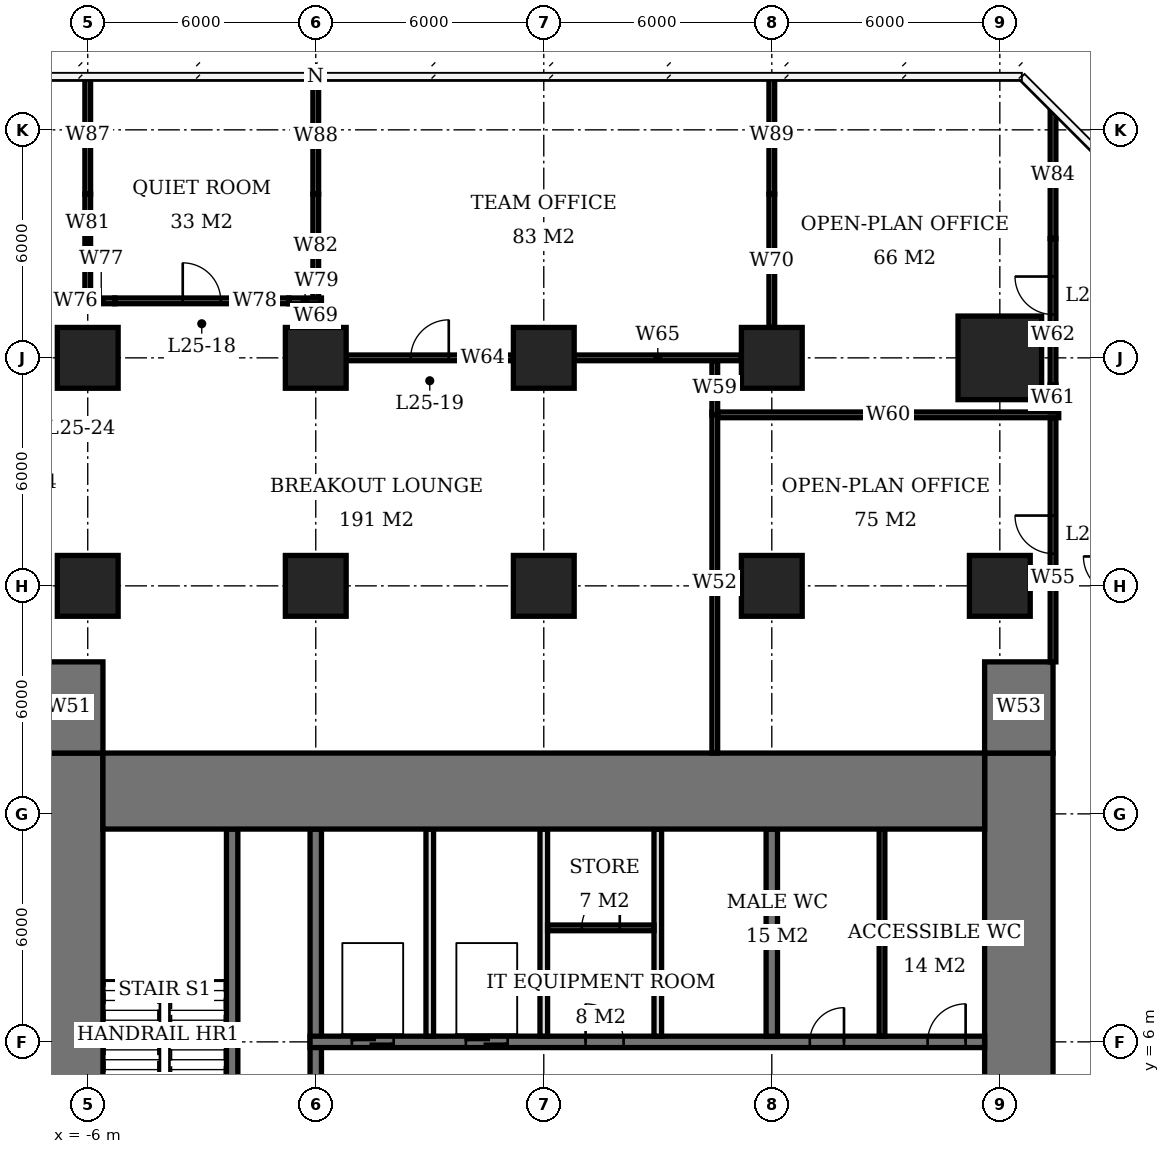
"""IFC4 building model, lengths in metres.
Left out: names, types, materials, properties, quantities, classifications, styles, units other than length and angle.
Written with IfcOpenShell. Run it as: python <this file> out.ifc"""

import sys

from ifc_helpers import new_model, si_unit, direction, frame, frame_2d, origin, origin_2d, place, context, subcontext, project, spatial, rectangle, extrude, element, fill, save


model = new_model("IFC4")
c1 = context("Model", 3, precision=1e-05, world=origin(), true_north=direction((0.0, 1.0)))
c2 = subcontext(c1, "Body", "Model", "MODEL_VIEW")
j1 = project(units=[si_unit("LENGTHUNIT", "METRE"), si_unit("PLANEANGLEUNIT", "RADIAN")], contexts=[c1])
p1 = place(None, origin())
s1 = spatial("IfcSite", under=j1, at=p1, CompositionType="ELEMENT")
p2 = place(p1, origin())
s2 = spatial("IfcBuilding", under=s1, at=p2, CompositionType="ELEMENT")
p3 = place(p2, frame((0.0, 0.0, 105.5)))
s3 = spatial("IfcBuildingStorey", under=s2, at=p3, CompositionType="ELEMENT", Elevation=105.5)
for number, where, z_axis, x_axis in (
    (1, (-6.0, 18.0, 0.0), (0.0, 0.0, 1.0), (1.0, 0.0, 0.0)),
    (2, (-6.0, 24.0, 0.0), (0.0, 0.0, 1.0), (1.0, 0.0, 0.0)),
    (3, (0.0, 18.0, 0.0), (0.0, 0.0, 1.0), (1.0, 0.0, 0.0)),
    (4, (0.0, 24.0, 0.0), (0.0, 0.0, 1.0), (1.0, 0.0, 0.0)),
    (5, (6.0, 18.0, 0.0), (0.0, 0.0, 1.0), (1.0, 0.0, 0.0)),
    (6, (6.0, 24.0, 0.0), (0.0, 0.0, 1.0), (1.0, 0.0, 0.0)),
    (7, (12.0, 18.0, 0.0), (0.0, 0.0, 1.0), (1.0, 0.0, 0.0)),
    (8, (12.0, 24.0, 0.0), (0.0, 0.0, 1.0), (1.0, 0.0, 0.0)),
    (9, (18.0, 18.0, 0.0), (0.0, 0.0, 1.0), (1.0, 0.0, 0.0)),
):
    element("IfcColumn", number, at=place(p3, frame(where, z_axis=z_axis, x_axis=x_axis)), inside=s3, PredefinedType="COLUMN", context=c2, shape_type="SweptSolid", body=[
        extrude(rectangle(XDim=1.6, YDim=1.6, at=origin_2d()), origin(), (0.0, 0.0, 1.0), 3.9),
    ])
p4 = place(p3, frame((18.0, 24.0, 0.0), z_axis=(0.0, 0.0, 1.0), x_axis=(1.0, 0.0, 0.0)))
e10 = element("IfcColumn", 10, at=p4, inside=s3, PredefinedType="COLUMN", context=c2, shape_type="SweptSolid", body=[
    extrude(rectangle(XDim=2.2, YDim=2.2, at=origin_2d()), origin(), (0.0, 0.0, 1.0), 3.9),
])
p5 = place(p3, frame((-5.6, 12.6, 0.0), z_axis=(0.0, 0.0, 1.0), x_axis=(1.0, 0.0, 0.0)))
e11 = element("IfcWall", 11, at=p5, inside=s3, PredefinedType="SHEAR", context=c2, shape_type="SweptSolid", body=[
    extrude(rectangle(XDim=23.2, YDim=2.0, at=frame_2d((11.6, 0.0))), origin(), (0.0, 0.0, 1.0), 3.9),
])
p6 = place(p3, frame((-6.5, -7.6, 0.0), z_axis=(0.0, 0.0, 1.0), x_axis=(0.0, 1.0, 0.0)))
e12 = element("IfcWall", 12, at=p6, inside=s3, PredefinedType="SHEAR", context=c2, shape_type="SweptSolid", body=[
    extrude(rectangle(XDim=21.2, YDim=1.8, at=frame_2d((10.6, 0.0))), origin(), (0.0, 0.0, 1.0), 3.9),
])
p7 = place(p6, frame((7.8, 0.0, 0.0)))
e13 = element("IfcOpeningElement", 13, at=p7, cuts=e12, PredefinedType="OPENING", context=c2, shape_type="SweptSolid", body=[
    extrude(rectangle(XDim=1.8, YDim=2.4, at=frame_2d((0.9, 1.2))), frame((0.0, 0.91, 0.0), z_axis=(0.0, -1.0, 0.0), x_axis=(1.0, 0.0, 0.0)), (0.0, 0.0, 1.0), 1.82),
])
p8 = place(p3, frame((18.5, -7.6, 0.0), z_axis=(0.0, 0.0, 1.0), x_axis=(0.0, 1.0, 0.0)))
e14 = element("IfcWall", 14, at=p8, inside=s3, PredefinedType="SHEAR", context=c2, shape_type="SweptSolid", body=[
    extrude(rectangle(XDim=21.2, YDim=1.8, at=frame_2d((10.6, 0.0))), origin(), (0.0, 0.0, 1.0), 3.9),
])
p9 = place(p8, frame((9.2, 0.0, 0.0)))
e15 = element("IfcOpeningElement", 15, at=p9, cuts=e14, PredefinedType="OPENING", context=c2, shape_type="SweptSolid", body=[
    extrude(rectangle(XDim=1.8, YDim=2.4, at=frame_2d((0.9, 1.2))), frame((0.0, 0.91, 0.0), z_axis=(0.0, -1.0, 0.0), x_axis=(1.0, 0.0, 0.0)), (0.0, 0.0, 1.0), 1.82),
])
for number, where, z_axis, x_axis in (
    (16, (-6.5, 13.6, 0.0), (0.0, 0.0, 1.0), (0.0, 1.0, 0.0)),
    (17, (18.5, 13.6, 0.0), (0.0, 0.0, 1.0), (0.0, 1.0, 0.0)),
):
    element("IfcWall", number, at=place(p3, frame(where, z_axis=z_axis, x_axis=x_axis)), inside=s3, PredefinedType="SHEAR", context=c2, shape_type="SweptSolid", body=[
        extrude(rectangle(XDim=2.4, YDim=1.8, at=frame_2d((1.2, 0.0))), origin(), (0.0, 0.0, 1.0), 3.9),
    ])
p10 = place(p3, frame((-0.15, 6.0, 0.0), z_axis=(0.0, 0.0, 1.0), x_axis=(1.0, 0.0, 0.0)))
e18 = element("IfcWall", 18, at=p10, inside=s3, PredefinedType="SHEAR", context=c2, shape_type="SweptSolid", body=[
    extrude(rectangle(XDim=17.75, YDim=0.3, at=frame_2d((8.875, 0.0))), origin(), (0.0, 0.0, 1.0), 3.9),
])
p11 = place(p10, frame((13.15, 0.0, 0.0)))
e19 = element("IfcOpeningElement", 19, at=p11, cuts=e18, PredefinedType="OPENING", context=c2, shape_type="SweptSolid", body=[
    extrude(rectangle(XDim=0.9, YDim=2.1, at=frame_2d((0.45, 1.05))), frame((0.0, 0.16, 0.0), z_axis=(0.0, -1.0, 0.0), x_axis=(1.0, 0.0, 0.0)), (0.0, 0.0, 1.0), 0.32),
])
p12 = place(p10, frame((16.25, 0.0, 0.0)))
e20 = element("IfcOpeningElement", 20, at=p12, cuts=e18, PredefinedType="OPENING", context=c2, shape_type="SweptSolid", body=[
    extrude(rectangle(XDim=1.0, YDim=2.1, at=frame_2d((0.5, 1.05))), frame((0.0, 0.16, 0.0), z_axis=(0.0, -1.0, 0.0), x_axis=(1.0, 0.0, 0.0)), (0.0, 0.0, 1.0), 0.32),
])
p13 = place(p10, frame((7.25, 0.0, 0.0)))
e21 = element("IfcOpeningElement", 21, at=p13, cuts=e18, PredefinedType="OPENING", context=c2, shape_type="SweptSolid", body=[
    extrude(rectangle(XDim=1.0, YDim=2.1, at=frame_2d((0.5, 1.05))), frame((0.0, 0.16, 0.0), z_axis=(0.0, -1.0, 0.0), x_axis=(1.0, 0.0, 0.0)), (0.0, 0.0, 1.0), 0.32),
])
p14 = place(p10, frame((1.1, 0.0, 0.0)))
e22 = element("IfcOpeningElement", 22, at=p14, cuts=e18, PredefinedType="OPENING", context=c2, shape_type="SweptSolid", body=[
    extrude(rectangle(XDim=1.1, YDim=2.1, at=frame_2d((0.55, 1.05))), frame((0.0, 0.16, 0.0), z_axis=(0.0, -1.0, 0.0), x_axis=(1.0, 0.0, 0.0)), (0.0, 0.0, 1.0), 0.32),
])
p15 = place(p10, frame((4.1, 0.0, 0.0)))
e23 = element("IfcOpeningElement", 23, at=p15, cuts=e18, PredefinedType="OPENING", context=c2, shape_type="SweptSolid", body=[
    extrude(rectangle(XDim=1.1, YDim=2.1, at=frame_2d((0.55, 1.05))), frame((0.0, 0.16, 0.0), z_axis=(0.0, -1.0, 0.0), x_axis=(1.0, 0.0, 0.0)), (0.0, 0.0, 1.0), 0.32),
])
p16 = place(p3, frame((0.0, 3.15, 0.0), z_axis=(0.0, 0.0, 1.0), x_axis=(0.0, 1.0, 0.0)))
e24 = element("IfcWall", 24, at=p16, inside=s3, PredefinedType="SHEAR", context=c2, shape_type="SweptSolid", body=[
    extrude(rectangle(XDim=8.45, YDim=0.3, at=frame_2d((4.225, 0.0))), origin(), (0.0, 0.0, 1.0), 3.9),
])
p17 = place(p3, frame((12.0, 6.15, 0.0), z_axis=(0.0, 0.0, 1.0), x_axis=(0.0, 1.0, 0.0)))
e25 = element("IfcWall", 25, at=p17, inside=s3, PredefinedType="SHEAR", context=c2, shape_type="SweptSolid", body=[
    extrude(rectangle(XDim=5.45, YDim=0.3, at=frame_2d((2.725, 0.0))), origin(), (0.0, 0.0, 1.0), 3.9),
])
p18 = place(p3, frame((-2.2, 3.15, 0.0), z_axis=(0.0, 0.0, 1.0), x_axis=(0.0, 1.0, 0.0)))
e26 = element("IfcWall", 26, at=p18, inside=s3, PredefinedType="SHEAR", context=c2, shape_type="SweptSolid", body=[
    extrude(rectangle(XDim=8.45, YDim=0.3, at=frame_2d((4.225, 0.0))), origin(), (0.0, 0.0, 1.0), 3.9),
])
for number, where, z_axis, x_axis in (
    (27, (3.0, 6.15, 0.0), (0.0, 0.0, 1.0), (0.0, 1.0, 0.0)),
    (28, (6.0, 6.15, 0.0), (0.0, 0.0, 1.0), (0.0, 1.0, 0.0)),
    (29, (9.0, 6.15, 0.0), (0.0, 0.0, 1.0), (0.0, 1.0, 0.0)),
):
    element("IfcWall", number, at=place(p3, frame(where, z_axis=z_axis, x_axis=x_axis)), inside=s3, PredefinedType="SOLIDWALL", context=c2, shape_type="SweptSolid", body=[
        extrude(rectangle(XDim=5.45, YDim=0.2, at=frame_2d((2.725, 0.0))), origin(), (0.0, 0.0, 1.0), 3.9),
    ])
p19 = place(p3, frame((14.9, 6.15, 0.0), z_axis=(0.0, 0.0, 1.0), x_axis=(0.0, 1.0, 0.0)))
e30 = element("IfcWall", 30, at=p19, inside=s3, PredefinedType="PLUMBINGWALL", context=c2, shape_type="SweptSolid", body=[
    extrude(rectangle(XDim=5.45, YDim=0.15, at=frame_2d((2.725, 0.0))), origin(), (0.0, 0.0, 1.0), 3.65),
])
p20 = place(p3, frame((6.1, 9.0, 0.0), z_axis=(0.0, 0.0, 1.0), x_axis=(1.0, 0.0, 0.0)))
e31 = element("IfcWall", 31, at=p20, inside=s3, PredefinedType="PARTITIONING", context=c2, shape_type="SweptSolid", body=[
    extrude(rectangle(XDim=2.8, YDim=0.15, at=frame_2d((1.4, 0.0))), origin(), (0.0, 0.0, 1.0), 3.65),
])
p21 = place(p20, frame((0.9, 0.0, 0.0)))
e32 = element("IfcOpeningElement", 32, at=p21, cuts=e31, PredefinedType="OPENING", context=c2, shape_type="SweptSolid", body=[
    extrude(rectangle(XDim=1.0, YDim=2.1, at=frame_2d((0.5, 1.05))), frame((0.0, 0.085, 0.0), z_axis=(0.0, -1.0, 0.0), x_axis=(1.0, 0.0, 0.0)), (0.0, 0.0, 1.0), 0.17),
])
p22 = place(p3, frame((0.8, 24.0, 0.0), z_axis=(0.0, 0.0, 1.0), x_axis=(1.0, 0.0, 0.0)))
e33 = element("IfcWall", 33, at=p22, inside=s3, PredefinedType="PARTITIONING", context=c2, shape_type="SweptSolid", body=[
    extrude(rectangle(XDim=4.4, YDim=0.15, at=frame_2d((2.2, 0.0))), origin(), (0.0, 0.0, 1.0), 3.65),
])
p23 = place(p22, frame((1.7, 0.0, 0.0)))
e34 = element("IfcOpeningElement", 34, at=p23, cuts=e33, PredefinedType="OPENING", context=c2, shape_type="SweptSolid", body=[
    extrude(rectangle(XDim=1.0, YDim=2.1, at=frame_2d((0.5, 1.05))), frame((0.0, 0.085, 0.0), z_axis=(0.0, -1.0, 0.0), x_axis=(1.0, 0.0, 0.0)), (0.0, 0.0, 1.0), 0.17),
])
p24 = place(p3, frame((6.8, 24.0, 0.0), z_axis=(0.0, 0.0, 1.0), x_axis=(1.0, 0.0, 0.0)))
e35 = element("IfcWall", 35, at=p24, inside=s3, PredefinedType="PARTITIONING", context=c2, shape_type="SweptSolid", body=[
    extrude(rectangle(XDim=4.4, YDim=0.15, at=frame_2d((2.2, 0.0))), origin(), (0.0, 0.0, 1.0), 3.65),
])
p25 = place(p3, frame((-11.49, 25.5, 0.0), z_axis=(0.0, 0.0, 1.0), x_axis=(1.0, 0.0, 0.0)))
e36 = element("IfcWall", 36, at=p25, inside=s3, PredefinedType="PARTITIONING", context=c2, shape_type="SweptSolid", body=[
    extrude(rectangle(XDim=4.78, YDim=0.15, at=frame_2d((2.39, 0.0))), origin(), (0.0, 0.0, 1.0), 3.65),
])
p26 = place(p25, frame((2.4, 0.0, 0.0)))
e37 = element("IfcOpeningElement", 37, at=p26, cuts=e36, PredefinedType="OPENING", context=c2, shape_type="SweptSolid", body=[
    extrude(rectangle(XDim=1.0, YDim=2.1, at=frame_2d((0.5, 1.05))), frame((0.0, 0.085, 0.0), z_axis=(0.0, -1.0, 0.0), x_axis=(1.0, 0.0, 0.0)), (0.0, 0.0, 1.0), 0.17),
])
p27 = place(p3, frame((-6.71, 25.5, 0.0), z_axis=(0.0, 0.0, 1.0), x_axis=(1.0, 0.0, 0.0)))
e38 = element("IfcWall", 38, at=p27, inside=s3, PredefinedType="PARTITIONING", context=c2, shape_type="SweptSolid", body=[
    extrude(rectangle(XDim=0.785, YDim=0.15, at=frame_2d((0.393, 0.0))), origin(), (0.0, 0.0, 1.0), 2.65),
])
p28 = place(p3, frame((-6.0, 25.5, 0.0), z_axis=(0.0, 0.0, 1.0), x_axis=(1.0, 0.0, 0.0)))
e39 = element("IfcWall", 39, at=p28, inside=s3, PredefinedType="PARTITIONING", context=c2, shape_type="SweptSolid", body=[
    extrude(rectangle(XDim=0.71, YDim=0.15, at=frame_2d((0.355, 0.0))), origin(), (0.0, 0.0, 1.0), 2.65),
])
p29 = place(p3, frame((-5.29, 25.5, 0.0), z_axis=(0.0, 0.0, 1.0), x_axis=(1.0, 0.0, 0.0)))
e40 = element("IfcWall", 40, at=p29, inside=s3, PredefinedType="PARTITIONING", context=c2, shape_type="SweptSolid", body=[
    extrude(rectangle(XDim=4.58, YDim=0.15, at=frame_2d((2.29, 0.0))), origin(), (0.0, 0.0, 1.0), 3.65),
])
p30 = place(p29, frame((1.79, 0.0, 0.0)))
e41 = element("IfcOpeningElement", 41, at=p30, cuts=e40, PredefinedType="OPENING", context=c2, shape_type="SweptSolid", body=[
    extrude(rectangle(XDim=1.0, YDim=2.1, at=frame_2d((0.5, 1.05))), frame((0.0, 0.085, 0.0), z_axis=(0.0, -1.0, 0.0), x_axis=(1.0, 0.0, 0.0)), (0.0, 0.0, 1.0), 0.17),
])
p31 = place(p3, frame((-0.71, 25.5, 0.0), z_axis=(0.0, 0.0, 1.0), x_axis=(1.0, 0.0, 0.0)))
e42 = element("IfcWall", 42, at=p31, inside=s3, PredefinedType="PARTITIONING", context=c2, shape_type="SweptSolid", body=[
    extrude(rectangle(XDim=0.86, YDim=0.15, at=frame_2d((0.43, 0.0))), origin(), (0.0, 0.0, 1.0), 2.65),
])
p32 = place(p3, frame((-6.0, 25.575, 0.0), z_axis=(0.0, 0.0, 1.0), x_axis=(0.0, 1.0, 0.0)))
e43 = element("IfcWall", 43, at=p32, inside=s3, PredefinedType="PARTITIONING", context=c2, shape_type="SweptSolid", body=[
    extrude(rectangle(XDim=2.735, YDim=0.15, at=frame_2d((1.368, 0.0))), origin(), (0.0, 0.0, 1.0), 2.65),
])
p33 = place(p3, frame((-6.0, 28.31, 0.0), z_axis=(0.0, 0.0, 1.0), x_axis=(0.0, 1.0, 0.0)))
e44 = element("IfcWall", 44, at=p33, inside=s3, PredefinedType="PARTITIONING", context=c2, shape_type="SweptSolid", body=[
    extrude(rectangle(XDim=3.09, YDim=0.15, at=frame_2d((1.545, 0.0))), origin(), (0.0, 0.0, 1.0), 3.65),
])
p34 = place(p3, frame((0.0, 24.8, 0.0), z_axis=(0.0, 0.0, 1.0), x_axis=(0.0, 1.0, 0.0)))
e45 = element("IfcWall", 45, at=p34, inside=s3, PredefinedType="PARTITIONING", context=c2, shape_type="SweptSolid", body=[
    extrude(rectangle(XDim=0.625, YDim=0.15, at=frame_2d((0.312, 0.0))), origin(), (0.0, 0.0, 1.0), 2.65),
])
p35 = place(p3, frame((0.0, 25.575, 0.0), z_axis=(0.0, 0.0, 1.0), x_axis=(0.0, 1.0, 0.0)))
e46 = element("IfcWall", 46, at=p35, inside=s3, PredefinedType="PARTITIONING", context=c2, shape_type="SweptSolid", body=[
    extrude(rectangle(XDim=2.735, YDim=0.15, at=frame_2d((1.368, 0.0))), origin(), (0.0, 0.0, 1.0), 2.65),
])
p36 = place(p3, frame((0.0, 28.31, 0.0), z_axis=(0.0, 0.0, 1.0), x_axis=(0.0, 1.0, 0.0)))
e47 = element("IfcWall", 47, at=p36, inside=s3, PredefinedType="PARTITIONING", context=c2, shape_type="SweptSolid", body=[
    extrude(rectangle(XDim=3.04, YDim=0.15, at=frame_2d((1.52, 0.0))), origin(), (0.0, 0.0, 1.0), 3.65),
])
p37 = place(p3, frame((12.0, 24.8, 0.0), z_axis=(0.0, 0.0, 1.0), x_axis=(0.0, 1.0, 0.0)))
e48 = element("IfcWall", 48, at=p37, inside=s3, PredefinedType="PARTITIONING", context=c2, shape_type="SweptSolid", body=[
    extrude(rectangle(XDim=3.51, YDim=0.15, at=frame_2d((1.755, 0.0))), origin(), (0.0, 0.0, 1.0), 2.65),
])
p38 = place(p3, frame((12.0, 28.31, 0.0), z_axis=(0.0, 0.0, 1.0), x_axis=(0.0, 1.0, 0.0)))
e49 = element("IfcWall", 49, at=p38, inside=s3, PredefinedType="PARTITIONING", context=c2, shape_type="SweptSolid", body=[
    extrude(rectangle(XDim=3.09, YDim=0.15, at=frame_2d((1.545, 0.0))), origin(), (0.0, 0.0, 1.0), 3.65),
])
p39 = place(p3, frame((10.5, 13.6, 0.0), z_axis=(0.0, 0.0, 1.0), x_axis=(0.0, 1.0, 0.0)))
e50 = element("IfcWall", 50, at=p39, inside=s3, PredefinedType="PARTITIONING", context=c2, shape_type="SweptSolid", body=[
    extrude(rectangle(XDim=8.975, YDim=0.15, at=frame_2d((4.487, 0.0))), origin(), (0.0, 0.0, 1.0), 3.65),
])
p40 = place(p3, frame((10.5, 22.5, 0.0), z_axis=(0.0, 0.0, 1.0), x_axis=(0.0, 1.0, 0.0)))
e51 = element("IfcWall", 51, at=p40, inside=s3, PredefinedType="PARTITIONING", context=c2, shape_type="SweptSolid", body=[
    extrude(rectangle(XDim=1.425, YDim=0.15, at=frame_2d((0.712, 0.0))), origin(), (0.0, 0.0, 1.0), 3.65),
])
p41 = place(p3, frame((10.575, 22.5, 0.0), z_axis=(0.0, 0.0, 1.0), x_axis=(1.0, 0.0, 0.0)))
e52 = element("IfcWall", 52, at=p41, inside=s3, PredefinedType="PARTITIONING", context=c2, shape_type="SweptSolid", body=[
    extrude(rectangle(XDim=8.975, YDim=0.15, at=frame_2d((4.488, 0.0))), origin(), (0.0, 0.0, 1.0), 3.65),
])
p42 = place(p3, frame((19.4, 16.0, 0.0), z_axis=(0.0, 0.0, 1.0), x_axis=(0.0, 1.0, 0.0)))
e53 = element("IfcWall", 53, at=p42, inside=s3, PredefinedType="PARTITIONING", context=c2, shape_type="SweptSolid", body=[
    extrude(rectangle(XDim=6.425, YDim=0.15, at=frame_2d((3.212, 0.0))), origin(), (0.0, 0.0, 1.0), 3.65),
])
p43 = place(p42, frame((2.85, 0.0, 0.0)))
e54 = element("IfcOpeningElement", 54, at=p43, cuts=e53, PredefinedType="OPENING", context=c2, shape_type="SweptSolid", body=[
    extrude(rectangle(XDim=1.0, YDim=2.1, at=frame_2d((0.5, 1.05))), frame((0.0, 0.085, 0.0), z_axis=(0.0, -1.0, 0.0), x_axis=(1.0, 0.0, 0.0)), (0.0, 0.0, 1.0), 0.17),
])
p44 = place(p3, frame((19.4, 22.575, 0.0), z_axis=(0.0, 0.0, 1.0), x_axis=(0.0, 1.0, 0.0)))
e55 = element("IfcWall", 55, at=p44, inside=s3, PredefinedType="PARTITIONING", context=c2, shape_type="SweptSolid", body=[
    extrude(rectangle(XDim=0.715, YDim=0.15, at=frame_2d((0.357, 0.0))), origin(), (0.0, 0.0, 1.0), 3.65),
])
p45 = place(p3, frame((19.4, 23.29, 0.0), z_axis=(0.0, 0.0, 1.0), x_axis=(0.0, 1.0, 0.0)))
e56 = element("IfcWall", 56, at=p45, inside=s3, PredefinedType="PARTITIONING", context=c2, shape_type="SweptSolid", body=[
    extrude(rectangle(XDim=3.85, YDim=0.15, at=frame_2d((1.925, 0.0))), origin(), (0.0, 0.0, 1.0), 2.65),
])
p46 = place(p45, frame((1.85, 0.0, 0.0)))
e57 = element("IfcOpeningElement", 57, at=p46, cuts=e56, PredefinedType="OPENING", context=c2, shape_type="SweptSolid", body=[
    extrude(rectangle(XDim=1.0, YDim=2.1, at=frame_2d((0.5, 1.05))), frame((0.0, 0.085, 0.0), z_axis=(0.0, -1.0, 0.0), x_axis=(1.0, 0.0, 0.0)), (0.0, 0.0, 1.0), 0.17),
])
p47 = place(p3, frame((19.4, 27.14, 0.0), z_axis=(0.0, 0.0, 1.0), x_axis=(0.0, 1.0, 0.0)))
e58 = element("IfcWall", 58, at=p47, inside=s3, PredefinedType="PARTITIONING", context=c2, shape_type="SweptSolid", body=[
    extrude(rectangle(XDim=3.349, YDim=0.15, at=frame_2d((1.675, 0.0))), origin(), (0.0, 0.0, 1.0), 3.65),
])
p48 = place(p11, origin())
e59 = element("IfcDoor", 59, at=p48, inside=s3, OperationType="SINGLE_SWING_RIGHT", PredefinedType="DOOR", context=c2, shape_type="SweptSolid", body=[
    extrude(rectangle(XDim=0.9, YDim=2.1, at=frame_2d((0.45, 1.05))), frame((0.0, 0.025, 0.0), z_axis=(0.0, -1.0, 0.0), x_axis=(1.0, 0.0, 0.0)), (0.0, 0.0, 1.0), 0.05),
])
fill(e19, e59)
p49 = place(p12, origin())
e60 = element("IfcDoor", 60, at=p49, inside=s3, OperationType="SINGLE_SWING_RIGHT", PredefinedType="DOOR", context=c2, shape_type="SweptSolid", body=[
    extrude(rectangle(XDim=1.0, YDim=2.1, at=frame_2d((0.5, 1.05))), frame((0.0, 0.025, 0.0), z_axis=(0.0, -1.0, 0.0), x_axis=(1.0, 0.0, 0.0)), (0.0, 0.0, 1.0), 0.05),
])
fill(e20, e60)
p50 = place(p21, origin())
e61 = element("IfcDoor", 61, at=p50, inside=s3, OperationType="SINGLE_SWING_RIGHT", PredefinedType="DOOR", context=c2, shape_type="SweptSolid", body=[
    extrude(rectangle(XDim=1.0, YDim=2.1, at=frame_2d((0.5, 1.05))), frame((0.0, 0.025, 0.0), z_axis=(0.0, -1.0, 0.0), x_axis=(1.0, 0.0, 0.0)), (0.0, 0.0, 1.0), 0.05),
])
fill(e32, e61)
p51 = place(p13, origin())
e62 = element("IfcDoor", 62, at=p51, inside=s3, OperationType="SINGLE_SWING_LEFT", PredefinedType="DOOR", context=c2, shape_type="SweptSolid", body=[
    extrude(rectangle(XDim=1.0, YDim=2.1, at=frame_2d((0.5, 1.05))), frame((0.0, 0.025, 0.0), z_axis=(0.0, -1.0, 0.0), x_axis=(1.0, 0.0, 0.0)), (0.0, 0.0, 1.0), 0.05),
])
fill(e21, e62)
p52 = place(p14, origin())
e63 = element("IfcDoor", 63, at=p52, inside=s3, OperationType="DOUBLE_DOOR_SLIDING", PredefinedType="USERDEFINED", context=c2, shape_type="SweptSolid", body=[
    extrude(rectangle(XDim=1.1, YDim=2.1, at=frame_2d((0.55, 1.05))), frame((0.0, 0.025, 0.0), z_axis=(0.0, -1.0, 0.0), x_axis=(1.0, 0.0, 0.0)), (0.0, 0.0, 1.0), 0.05),
])
fill(e22, e63)
p53 = place(p15, origin())
e64 = element("IfcDoor", 64, at=p53, inside=s3, OperationType="DOUBLE_DOOR_SLIDING", PredefinedType="USERDEFINED", context=c2, shape_type="SweptSolid", body=[
    extrude(rectangle(XDim=1.1, YDim=2.1, at=frame_2d((0.55, 1.05))), frame((0.0, 0.025, 0.0), z_axis=(0.0, -1.0, 0.0), x_axis=(1.0, 0.0, 0.0)), (0.0, 0.0, 1.0), 0.05),
])
fill(e23, e64)
p54 = place(p30, origin())
e65 = element("IfcDoor", 65, at=p54, inside=s3, OperationType="SINGLE_SWING_LEFT", PredefinedType="DOOR", context=c2, shape_type="SweptSolid", body=[
    extrude(rectangle(XDim=1.0, YDim=2.1, at=frame_2d((0.5, 1.05))), frame((0.0, 0.025, 0.0), z_axis=(0.0, -1.0, 0.0), x_axis=(1.0, 0.0, 0.0)), (0.0, 0.0, 1.0), 0.05),
])
fill(e41, e65)
p55 = place(p23, origin())
e66 = element("IfcDoor", 66, at=p55, inside=s3, OperationType="SINGLE_SWING_RIGHT", PredefinedType="DOOR", context=c2, shape_type="SweptSolid", body=[
    extrude(rectangle(XDim=1.0, YDim=2.1, at=frame_2d((0.5, 1.05))), frame((0.0, 0.025, 0.0), z_axis=(0.0, -1.0, 0.0), x_axis=(1.0, 0.0, 0.0)), (0.0, 0.0, 1.0), 0.05),
])
fill(e34, e66)
p56 = place(p43, origin())
e67 = element("IfcDoor", 67, at=p56, inside=s3, OperationType="SINGLE_SWING_RIGHT", PredefinedType="DOOR", context=c2, shape_type="SweptSolid", body=[
    extrude(rectangle(XDim=1.0, YDim=2.1, at=frame_2d((0.5, 1.05))), frame((0.0, 0.025, 0.0), z_axis=(0.0, -1.0, 0.0), x_axis=(1.0, 0.0, 0.0)), (0.0, 0.0, 1.0), 0.05),
])
fill(e54, e67)
p57 = place(p46, origin())
e68 = element("IfcDoor", 68, at=p57, inside=s3, OperationType="SINGLE_SWING_RIGHT", PredefinedType="DOOR", context=c2, shape_type="SweptSolid", body=[
    extrude(rectangle(XDim=1.0, YDim=2.1, at=frame_2d((0.5, 1.05))), frame((0.0, 0.025, 0.0), z_axis=(0.0, -1.0, 0.0), x_axis=(1.0, 0.0, 0.0)), (0.0, 0.0, 1.0), 0.05),
])
fill(e57, e68)
save(model, sys.argv[1])
